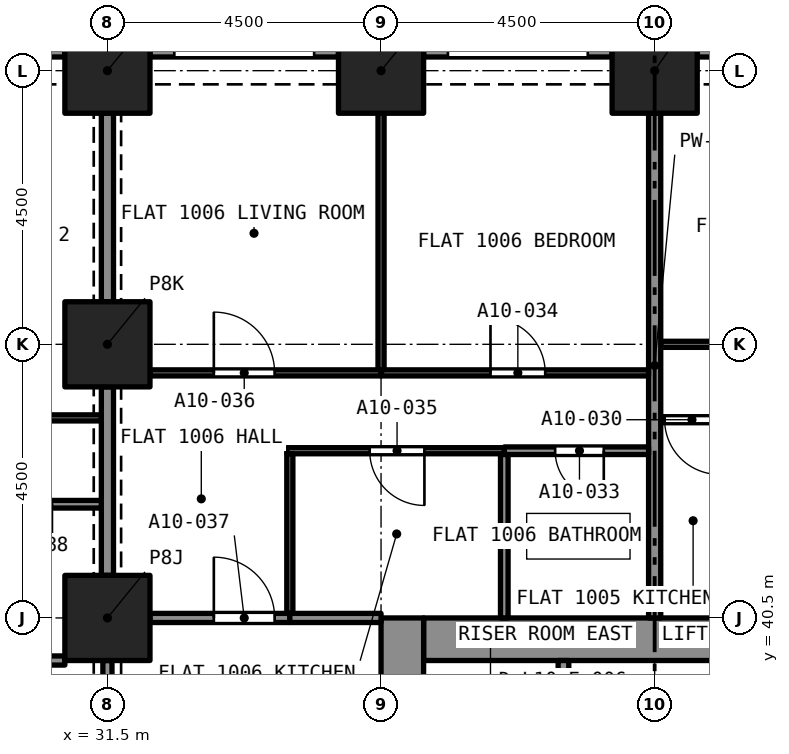
"""IFC4 building model, lengths in metres.
Left out: names, types, materials, properties, quantities, classifications, styles, units other than length and angle.
Written with IfcOpenShell. Run it as: python <this file> out.ifc"""

import sys

from ifc_helpers import new_model, si_unit, direction, frame, frame_2d, origin, origin_2d, place, context, subcontext, project, spatial, rectangle, extrude, element, fill, save


model = new_model("IFC4")
c1 = context("Model", 3, precision=1e-05, world=origin(), true_north=direction((0.0, 1.0)))
c2 = subcontext(c1, "Body", "Model", "MODEL_VIEW")
j1 = project(units=[si_unit("LENGTHUNIT", "METRE"), si_unit("PLANEANGLEUNIT", "RADIAN")], contexts=[c1])
p1 = place(None, origin())
s1 = spatial("IfcSite", under=j1, at=p1, CompositionType="ELEMENT")
p2 = place(p1, origin())
s2 = spatial("IfcBuilding", under=s1, at=p2, CompositionType="ELEMENT")
p3 = place(p2, frame((0.0, 0.0, 43.2)))
s3 = spatial("IfcBuildingStorey", under=s2, at=p3, CompositionType="ELEMENT", Elevation=43.2)
for number, where, z_axis, x_axis in (
    (1, (31.5, 40.5, 0.0), (0.0, 0.0, 1.0), (1.0, 0.0, 0.0)),
    (2, (31.5, 45.0, 0.0), (0.0, 0.0, 1.0), (1.0, 0.0, 0.0)),
    (3, (31.5, 49.5, 0.0), (0.0, 0.0, 1.0), (1.0, 0.0, 0.0)),
    (4, (36.0, 49.5, 0.0), (0.0, 0.0, 1.0), (1.0, 0.0, 0.0)),
    (5, (40.5, 49.5, 0.0), (0.0, 0.0, 1.0), (1.0, 0.0, 0.0)),
):
    element("IfcColumn", number, at=place(p3, frame(where, z_axis=z_axis, x_axis=x_axis)), inside=s3, PredefinedType="COLUMN", context=c2, shape_type="SweptSolid", body=[
        extrude(rectangle(XDim=1.4, YDim=1.4, at=origin_2d()), origin(), (0.0, 0.0, 1.0), 3.2),
    ])
p4 = place(p3, frame((36.7, 40.15, 0.0), z_axis=(0.0, 0.0, 1.0), x_axis=(1.0, 0.0, 0.0)))
e6 = element("IfcWall", 6, at=p4, inside=s3, PredefinedType="SOLIDWALL", context=c2, shape_type="SweptSolid", body=[
    extrude(rectangle(XDim=7.6, YDim=0.7, at=frame_2d((3.8, 0.0))), origin(), (0.0, 0.0, 1.0), 3.2),
])
p5 = place(p3, frame((36.35, 27.0, 0.0), z_axis=(0.0, 0.0, 1.0), x_axis=(0.0, 1.0, 0.0)))
e7 = element("IfcWall", 7, at=p5, inside=s3, PredefinedType="SOLIDWALL", context=c2, shape_type="SweptSolid", body=[
    extrude(rectangle(XDim=13.5, YDim=0.7, at=frame_2d((6.75, 0.0))), origin(), (0.0, 0.0, 1.0), 3.2),
])
p6 = place(p5, frame((8.95, 0.0, 0.0)))
e8 = element("IfcOpeningElement", 8, at=p6, cuts=e7, PredefinedType="OPENING", context=c2, shape_type="SweptSolid", body=[
    extrude(rectangle(XDim=1.2, YDim=2.1, at=frame_2d((0.6, 1.05))), frame((0.0, 0.36, 0.0), z_axis=(0.0, -1.0, 0.0), x_axis=(1.0, 0.0, 0.0)), (0.0, 0.0, 1.0), 0.72),
])
p7 = place(p3, frame((41.2, 49.875, 0.0), z_axis=(0.0, 0.0, 1.0), x_axis=(1.0, 0.0, 0.0)))
e9 = element("IfcWall", 9, at=p7, inside=s3, PredefinedType="SOLIDWALL", context=c2, shape_type="SweptSolid", body=[
    extrude(rectangle(XDim=3.1, YDim=0.3, at=frame_2d((1.55, 0.0))), origin(), (0.0, 0.0, 1.0), 3.2),
])
p8 = place(p7, frame((0.4, 0.0, 0.45)))
e10 = element("IfcOpeningElement", 10, at=p8, cuts=e9, PredefinedType="OPENING", context=c2, shape_type="SweptSolid", body=[
    extrude(rectangle(XDim=2.3, YDim=1.95, at=frame_2d((1.15, 0.975))), frame((0.0, 0.16, 0.0), z_axis=(0.0, -1.0, 0.0), x_axis=(1.0, 0.0, 0.0)), (0.0, 0.0, 1.0), 0.32),
])
p9 = place(p3, frame((36.7, 49.875, 0.0), z_axis=(0.0, 0.0, 1.0), x_axis=(1.0, 0.0, 0.0)))
e11 = element("IfcWall", 11, at=p9, inside=s3, PredefinedType="SOLIDWALL", context=c2, shape_type="SweptSolid", body=[
    extrude(rectangle(XDim=3.1, YDim=0.3, at=frame_2d((1.55, 0.0))), origin(), (0.0, 0.0, 1.0), 3.2),
])
p10 = place(p9, frame((0.4, 0.0, 0.45)))
e12 = element("IfcOpeningElement", 12, at=p10, cuts=e11, PredefinedType="OPENING", context=c2, shape_type="SweptSolid", body=[
    extrude(rectangle(XDim=2.3, YDim=1.95, at=frame_2d((1.15, 0.975))), frame((0.0, 0.16, 0.0), z_axis=(0.0, -1.0, 0.0), x_axis=(1.0, 0.0, 0.0)), (0.0, 0.0, 1.0), 0.32),
])
p11 = place(p3, frame((32.2, 49.875, 0.0), z_axis=(0.0, 0.0, 1.0), x_axis=(1.0, 0.0, 0.0)))
e13 = element("IfcWall", 13, at=p11, inside=s3, PredefinedType="SOLIDWALL", context=c2, shape_type="SweptSolid", body=[
    extrude(rectangle(XDim=3.1, YDim=0.3, at=frame_2d((1.55, 0.0))), origin(), (0.0, 0.0, 1.0), 3.2),
])
p12 = place(p11, frame((0.4, 0.0, 0.45)))
e14 = element("IfcOpeningElement", 14, at=p12, cuts=e13, PredefinedType="OPENING", context=c2, shape_type="SweptSolid", body=[
    extrude(rectangle(XDim=2.3, YDim=1.95, at=frame_2d((1.15, 0.975))), frame((0.0, 0.16, 0.0), z_axis=(0.0, -1.0, 0.0), x_axis=(1.0, 0.0, 0.0)), (0.0, 0.0, 1.0), 0.32),
])
p13 = place(p3, frame((27.7, 49.875, 0.0), z_axis=(0.0, 0.0, 1.0), x_axis=(1.0, 0.0, 0.0)))
e15 = element("IfcWall", 15, at=p13, inside=s3, PredefinedType="SOLIDWALL", context=c2, shape_type="SweptSolid", body=[
    extrude(rectangle(XDim=3.1, YDim=0.3, at=frame_2d((1.55, 0.0))), origin(), (0.0, 0.0, 1.0), 3.2),
])
p14 = place(p13, frame((0.4, 0.0, 0.45)))
e16 = element("IfcOpeningElement", 16, at=p14, cuts=e15, PredefinedType="OPENING", context=c2, shape_type="SweptSolid", body=[
    extrude(rectangle(XDim=2.3, YDim=1.95, at=frame_2d((1.15, 0.975))), frame((0.0, 0.16, 0.0), z_axis=(0.0, -1.0, 0.0), x_axis=(1.0, 0.0, 0.0)), (0.0, 0.0, 1.0), 0.32),
])
p15 = place(p3, frame((40.6, 45.0, 0.0), z_axis=(0.0, 0.0, 1.0), x_axis=(1.0, 0.0, 0.0)))
e17 = element("IfcWall", 17, at=p15, inside=s3, PredefinedType="PARTITIONING", context=c2, shape_type="SweptSolid", body=[
    extrude(rectangle(XDim=4.4, YDim=0.1, at=frame_2d((2.2, 0.0))), origin(), (0.0, 0.0, 1.0), 2.9),
])
p16 = place(p15, frame((1.7, 0.0, 0.0)))
e18 = element("IfcOpeningElement", 18, at=p16, cuts=e17, PredefinedType="OPENING", context=c2, shape_type="SweptSolid", body=[
    extrude(rectangle(XDim=0.9, YDim=2.1, at=frame_2d((0.45, 1.05))), frame((0.0, 0.06, 0.0), z_axis=(0.0, -1.0, 0.0), x_axis=(1.0, 0.0, 0.0)), (0.0, 0.0, 1.0), 0.12),
])
p17 = place(p3, frame((41.727, 43.76, 0.0), z_axis=(0.0, 0.0, 1.0), x_axis=(-1.0, 0.0, 0.0)))
e19 = element("IfcWall", 19, at=p17, inside=s3, PredefinedType="PARTITIONING", context=c2, shape_type="SweptSolid", body=[
    extrude(rectangle(XDim=1.127, YDim=0.1, at=frame_2d((0.563, 0.0))), origin(), (0.0, 0.0, 1.0), 2.9),
])
p18 = place(p17, frame((0.164, 0.0, 0.0)))
e20 = element("IfcOpeningElement", 20, at=p18, cuts=e19, PredefinedType="OPENING", context=c2, shape_type="SweptSolid", body=[
    extrude(rectangle(XDim=0.9, YDim=2.1, at=frame_2d((0.45, 1.05))), frame((0.0, 0.06, 0.0), z_axis=(0.0, -1.0, 0.0), x_axis=(1.0, 0.0, 0.0)), (0.0, 0.0, 1.0), 0.12),
])
p19 = place(p3, frame((40.5, 40.5, 0.0), z_axis=(0.0, 0.0, 1.0), x_axis=(0.0, 1.0, 0.0)))
e21 = element("IfcWall", 21, at=p19, inside=s3, PredefinedType="PARTITIONING", context=c2, shape_type="SweptSolid", body=[
    extrude(rectangle(XDim=8.3, YDim=0.2, at=frame_2d((4.15, 0.0))), origin(), (0.0, 0.0, 1.0), 2.9),
])
p20 = place(p3, frame((40.4, 43.25, 0.0), z_axis=(0.0, 0.0, 1.0), x_axis=(-1.0, 0.0, 0.0)))
e22 = element("IfcWall", 22, at=p20, inside=s3, PredefinedType="PARTITIONING", context=c2, shape_type="SweptSolid", body=[
    extrude(rectangle(XDim=2.373, YDim=0.125, at=frame_2d((1.187, 0.0))), origin(), (0.0, 0.0, 1.0), 2.9),
])
p21 = place(p20, frame((0.737, 0.0, 0.0)))
e23 = element("IfcOpeningElement", 23, at=p21, cuts=e22, PredefinedType="OPENING", context=c2, shape_type="SweptSolid", body=[
    extrude(rectangle(XDim=0.8, YDim=2.1, at=frame_2d((0.4, 1.05))), frame((0.0, 0.073, 0.0), z_axis=(0.0, -1.0, 0.0), x_axis=(1.0, 0.0, 0.0)), (0.0, 0.0, 1.0), 0.145),
])
p22 = place(p3, frame((38.027, 40.5, 0.0), z_axis=(0.0, 0.0, 1.0), x_axis=(0.0, 1.0, 0.0)))
e24 = element("IfcWall", 24, at=p22, inside=s3, PredefinedType="PARTITIONING", context=c2, shape_type="SweptSolid", body=[
    extrude(rectangle(XDim=2.688, YDim=0.125, at=frame_2d((1.344, 0.0))), origin(), (0.0, 0.0, 1.0), 2.9),
])
p23 = place(p3, frame((36.0, 44.53, 0.0), z_axis=(0.0, 0.0, 1.0), x_axis=(1.0, 0.0, 0.0)))
e25 = element("IfcWall", 25, at=p23, inside=s3, PredefinedType="PARTITIONING", context=c2, shape_type="SweptSolid", body=[
    extrude(rectangle(XDim=4.4, YDim=0.1, at=frame_2d((2.2, 0.0))), origin(), (0.0, 0.0, 1.0), 2.9),
])
p24 = place(p23, frame((1.8, 0.0, 0.0)))
e26 = element("IfcOpeningElement", 26, at=p24, cuts=e25, PredefinedType="OPENING", context=c2, shape_type="SweptSolid", body=[
    extrude(rectangle(XDim=0.9, YDim=2.1, at=frame_2d((0.45, 1.05))), frame((0.0, 0.06, 0.0), z_axis=(0.0, -1.0, 0.0), x_axis=(1.0, 0.0, 0.0)), (0.0, 0.0, 1.0), 0.12),
])
p25 = place(p3, frame((36.0, 44.58, 0.0), z_axis=(0.0, 0.0, 1.0), x_axis=(0.0, 1.0, 0.0)))
e27 = element("IfcWall", 27, at=p25, inside=s3, PredefinedType="PARTITIONING", context=c2, shape_type="SweptSolid", body=[
    extrude(rectangle(XDim=4.22, YDim=0.1, at=frame_2d((2.11, 0.0))), origin(), (0.0, 0.0, 1.0), 2.9),
])
p26 = place(p3, frame((38.027, 43.25, 0.0), z_axis=(0.0, 0.0, 1.0), x_axis=(-1.0, 0.0, 0.0)))
e28 = element("IfcWall", 28, at=p26, inside=s3, PredefinedType="PARTITIONING", context=c2, shape_type="SweptSolid", body=[
    extrude(rectangle(XDim=3.577, YDim=0.1, at=frame_2d((1.788, 0.0))), origin(), (0.0, 0.0, 1.0), 2.9),
])
p27 = place(p26, frame((1.313, 0.0, 0.0)))
e29 = element("IfcOpeningElement", 29, at=p27, cuts=e28, PredefinedType="OPENING", context=c2, shape_type="SweptSolid", body=[
    extrude(rectangle(XDim=0.9, YDim=2.1, at=frame_2d((0.45, 1.05))), frame((0.0, 0.06, 0.0), z_axis=(0.0, -1.0, 0.0), x_axis=(1.0, 0.0, 0.0)), (0.0, 0.0, 1.0), 0.12),
])
p28 = place(p3, frame((34.5, 40.575, 0.0), z_axis=(0.0, 0.0, 1.0), x_axis=(0.0, 1.0, 0.0)))
e30 = element("IfcWall", 30, at=p28, inside=s3, PredefinedType="PARTITIONING", context=c2, shape_type="SweptSolid", body=[
    extrude(rectangle(XDim=2.625, YDim=0.1, at=frame_2d((1.312, 0.0))), origin(), (0.0, 0.0, 1.0), 2.9),
])
p29 = place(p3, frame((32.2, 44.53, 0.0), z_axis=(0.0, 0.0, 1.0), x_axis=(1.0, 0.0, 0.0)))
e31 = element("IfcWall", 31, at=p29, inside=s3, PredefinedType="PARTITIONING", context=c2, shape_type="SweptSolid", body=[
    extrude(rectangle(XDim=3.8, YDim=0.1, at=frame_2d((1.9, 0.0))), origin(), (0.0, 0.0, 1.0), 2.9),
])
p30 = place(p29, frame((1.05, 0.0, 0.0)))
e32 = element("IfcOpeningElement", 32, at=p30, cuts=e31, PredefinedType="OPENING", context=c2, shape_type="SweptSolid", body=[
    extrude(rectangle(XDim=1.0, YDim=2.1, at=frame_2d((0.5, 1.05))), frame((0.0, 0.06, 0.0), z_axis=(0.0, -1.0, 0.0), x_axis=(1.0, 0.0, 0.0)), (0.0, 0.0, 1.0), 0.12),
])
p31 = place(p3, frame((31.5, 41.2, 0.0), z_axis=(0.0, 0.0, 1.0), x_axis=(0.0, 1.0, 0.0)))
e33 = element("IfcWall", 33, at=p31, inside=s3, PredefinedType="PARTITIONING", context=c2, shape_type="SweptSolid", body=[
    extrude(rectangle(XDim=3.1, YDim=0.2, at=frame_2d((1.55, 0.0))), origin(), (0.0, 0.0, 1.0), 2.38),
])
p32 = place(p3, frame((32.2, 40.5, 0.0), z_axis=(0.0, 0.0, 1.0), x_axis=(1.0, 0.0, 0.0)))
e34 = element("IfcWall", 34, at=p32, inside=s3, PredefinedType="PARTITIONING", context=c2, shape_type="SweptSolid", body=[
    extrude(rectangle(XDim=2.3, YDim=0.15, at=frame_2d((1.15, 0.0))), origin(), (0.0, 0.0, 1.0), 2.9),
])
p33 = place(p32, frame((1.05, 0.0, 0.0)))
e35 = element("IfcOpeningElement", 35, at=p33, cuts=e34, PredefinedType="OPENING", context=c2, shape_type="SweptSolid", body=[
    extrude(rectangle(XDim=1.0, YDim=2.1, at=frame_2d((0.5, 1.05))), frame((0.0, 0.085, 0.0), z_axis=(0.0, -1.0, 0.0), x_axis=(1.0, 0.0, 0.0)), (0.0, 0.0, 1.0), 0.17),
])
p34 = place(p3, frame((34.5, 40.5, 0.0), z_axis=(0.0, 0.0, 1.0), x_axis=(1.0, 0.0, 0.0)))
e36 = element("IfcWall", 36, at=p34, inside=s3, PredefinedType="PARTITIONING", context=c2, shape_type="SweptSolid", body=[
    extrude(rectangle(XDim=1.5, YDim=0.15, at=frame_2d((0.75, 0.0))), origin(), (0.0, 0.0, 1.0), 2.9),
])
p35 = place(p3, frame((31.5, 45.7, 0.0), z_axis=(0.0, 0.0, 1.0), x_axis=(0.0, 1.0, 0.0)))
e37 = element("IfcWall", 37, at=p35, inside=s3, PredefinedType="PARTITIONING", context=c2, shape_type="SweptSolid", body=[
    extrude(rectangle(XDim=3.1, YDim=0.2, at=frame_2d((1.55, 0.0))), origin(), (0.0, 0.0, 1.0), 2.38),
])
p36 = place(p3, frame((31.4, 42.37, 0.0), z_axis=(0.0, 0.0, 1.0), x_axis=(-1.0, 0.0, 0.0)))
e38 = element("IfcWall", 38, at=p36, inside=s3, PredefinedType="PARTITIONING", context=c2, shape_type="SweptSolid", body=[
    extrude(rectangle(XDim=2.587, YDim=0.125, at=frame_2d((1.294, 0.0))), origin(), (0.0, 0.0, 1.0), 2.75),
])
p37 = place(p36, frame((0.812, 0.0, 0.0)))
e39 = element("IfcOpeningElement", 39, at=p37, cuts=e38, PredefinedType="OPENING", context=c2, shape_type="SweptSolid", body=[
    extrude(rectangle(XDim=0.8, YDim=2.1, at=frame_2d((0.4, 1.05))), frame((0.0, 0.073, 0.0), z_axis=(0.0, -1.0, 0.0), x_axis=(1.0, 0.0, 0.0)), (0.0, 0.0, 1.0), 0.145),
])
p38 = place(p3, frame((28.875, 39.8, 0.0), z_axis=(0.0, 0.0, 1.0), x_axis=(1.0, 0.0, 0.0)))
e40 = element("IfcWall", 40, at=p38, inside=s3, PredefinedType="PARTITIONING", context=c2, shape_type="SweptSolid", body=[
    extrude(rectangle(XDim=1.925, YDim=0.15, at=frame_2d((0.962, 0.0))), origin(), (0.0, 0.0, 1.0), 2.75),
])
p39 = place(p3, frame((27.0, 43.79, 0.0), z_axis=(0.0, 0.0, 1.0), x_axis=(1.0, 0.0, 0.0)))
e41 = element("IfcWall", 41, at=p39, inside=s3, PredefinedType="PARTITIONING", context=c2, shape_type="SweptSolid", body=[
    extrude(rectangle(XDim=4.4, YDim=0.1, at=frame_2d((2.2, 0.0))), origin(), (0.0, 0.0, 1.0), 2.75),
])
p40 = place(p39, frame((1.8, 0.0, 0.0)))
e42 = element("IfcOpeningElement", 42, at=p40, cuts=e41, PredefinedType="OPENING", context=c2, shape_type="SweptSolid", body=[
    extrude(rectangle(XDim=0.9, YDim=2.1, at=frame_2d((0.45, 1.05))), frame((0.0, 0.06, 0.0), z_axis=(0.0, -1.0, 0.0), x_axis=(1.0, 0.0, 0.0)), (0.0, 0.0, 1.0), 0.12),
])
p41 = place(p3, frame((31.5, 36.7, 0.0), z_axis=(0.0, 0.0, 1.0), x_axis=(0.0, 1.0, 0.0)))
e43 = element("IfcWall", 43, at=p41, inside=s3, PredefinedType="PARTITIONING", context=c2, shape_type="SweptSolid", body=[
    extrude(rectangle(XDim=3.1, YDim=0.15, at=frame_2d((1.55, 0.0))), origin(), (0.0, 0.0, 1.0), 2.38),
])
p42 = place(p41, frame((0.95, 0.0, 0.0)))
e44 = element("IfcOpeningElement", 44, at=p42, cuts=e43, PredefinedType="OPENING", context=c2, shape_type="SweptSolid", body=[
    extrude(rectangle(XDim=1.2, YDim=2.1, at=frame_2d((0.6, 1.05))), frame((0.0, 0.085, 0.0), z_axis=(0.0, -1.0, 0.0), x_axis=(1.0, 0.0, 0.0)), (0.0, 0.0, 1.0), 0.17),
])
p43 = place(p3, frame((39.0, 37.5, 0.0), z_axis=(0.0, 0.0, 1.0), x_axis=(0.0, 1.0, 0.0)))
e45 = element("IfcWall", 45, at=p43, inside=s3, PredefinedType="SOLIDWALL", context=c2, shape_type="SweptSolid", body=[
    extrude(rectangle(XDim=2.3, YDim=0.175, at=frame_2d((1.15, 0.0))), origin(), (0.0, 0.0, 1.0), 2.9),
])
p44 = place(p18, origin())
e46 = element("IfcDoor", 46, at=p44, inside=s3, OperationType="SINGLE_SWING_RIGHT", PredefinedType="DOOR", context=c2, shape_type="SweptSolid", body=[
    extrude(rectangle(XDim=0.9, YDim=2.1, at=frame_2d((0.45, 1.05))), frame((0.0, 0.025, 0.0), z_axis=(0.0, -1.0, 0.0), x_axis=(1.0, 0.0, 0.0)), (0.0, 0.0, 1.0), 0.05),
])
fill(e20, e46)
p45 = place(p21, origin())
e47 = element("IfcDoor", 47, at=p45, inside=s3, OperationType="SINGLE_SWING_LEFT", PredefinedType="DOOR", context=c2, shape_type="SweptSolid", body=[
    extrude(rectangle(XDim=0.8, YDim=2.1, at=frame_2d((0.4, 1.05))), frame((0.0, 0.025, 0.0), z_axis=(0.0, -1.0, 0.0), x_axis=(1.0, 0.0, 0.0)), (0.0, 0.0, 1.0), 0.05),
])
fill(e23, e47)
p46 = place(p24, origin())
e48 = element("IfcDoor", 48, at=p46, inside=s3, OperationType="SINGLE_SWING_RIGHT", PredefinedType="DOOR", context=c2, shape_type="SweptSolid", body=[
    extrude(rectangle(XDim=0.9, YDim=2.1, at=frame_2d((0.45, 1.05))), frame((0.0, 0.025, 0.0), z_axis=(0.0, -1.0, 0.0), x_axis=(1.0, 0.0, 0.0)), (0.0, 0.0, 1.0), 0.05),
])
fill(e26, e48)
p47 = place(p27, origin())
e49 = element("IfcDoor", 49, at=p47, inside=s3, OperationType="SINGLE_SWING_LEFT", PredefinedType="DOOR", context=c2, shape_type="SweptSolid", body=[
    extrude(rectangle(XDim=0.9, YDim=2.1, at=frame_2d((0.45, 1.05))), frame((0.0, 0.025, 0.0), z_axis=(0.0, -1.0, 0.0), x_axis=(1.0, 0.0, 0.0)), (0.0, 0.0, 1.0), 0.05),
])
fill(e29, e49)
p48 = place(p30, origin())
e50 = element("IfcDoor", 50, at=p48, inside=s3, OperationType="SINGLE_SWING_LEFT", PredefinedType="DOOR", context=c2, shape_type="SweptSolid", body=[
    extrude(rectangle(XDim=1.0, YDim=2.1, at=frame_2d((0.5, 1.05))), frame((0.0, 0.025, 0.0), z_axis=(0.0, -1.0, 0.0), x_axis=(1.0, 0.0, 0.0)), (0.0, 0.0, 1.0), 0.05),
])
fill(e32, e50)
p49 = place(p33, origin())
e51 = element("IfcDoor", 51, at=p49, inside=s3, OperationType="SINGLE_SWING_RIGHT", PredefinedType="DOOR", context=c2, shape_type="SweptSolid", body=[
    extrude(rectangle(XDim=1.0, YDim=2.1, at=frame_2d((0.5, 1.05))), frame((0.0, 0.025, 0.0), z_axis=(0.0, -1.0, 0.0), x_axis=(1.0, 0.0, 0.0)), (0.0, 0.0, 1.0), 0.05),
])
fill(e35, e51)
save(model, sys.argv[1])
